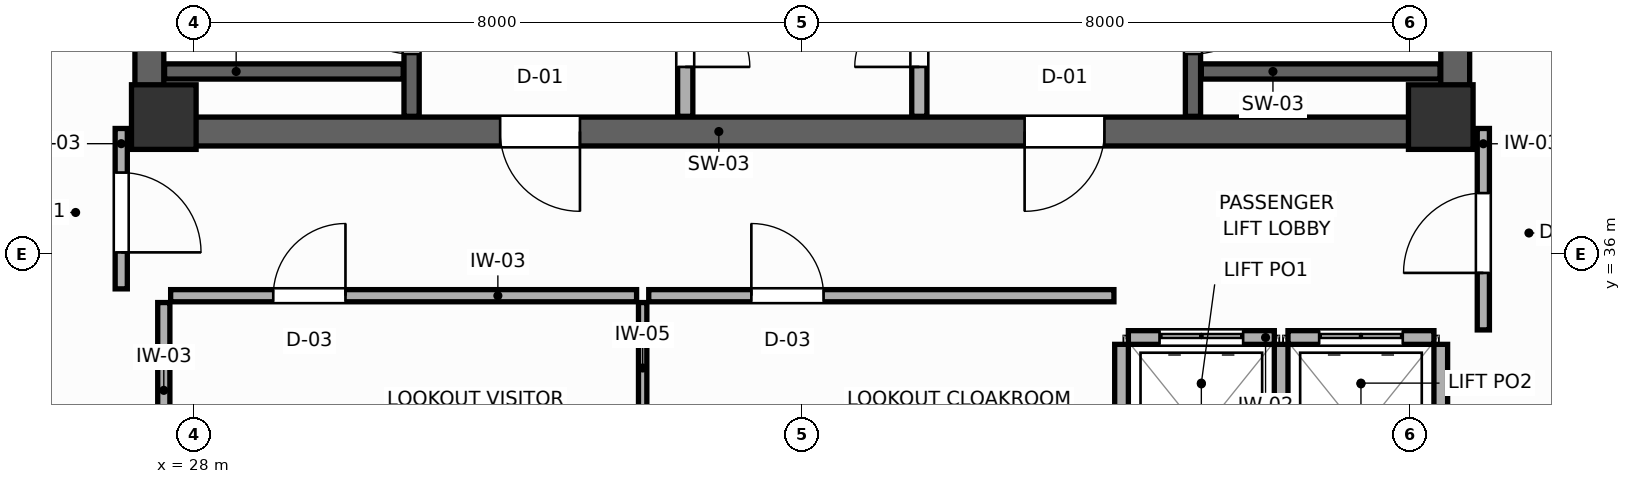
"""IFC4 building model, lengths in metres.
Left out: names, types, materials, properties, quantities, classifications, styles, units other than length and angle.
Written with IfcOpenShell. Run it as: python <this file> out.ifc"""

import sys

from ifc_helpers import new_model, si_unit, direction, frame, frame_2d, origin, origin_2d, place, context, subcontext, project, spatial, rectangle, extrude, source, transform, mapped, element, fill, save


model = new_model("IFC4")
c1 = context("Model", 3, precision=1e-05, world=origin(), true_north=direction((0.0, 1.0)))
c2 = subcontext(c1, "Body", "Model", "MODEL_VIEW")
j1 = project(units=[si_unit("LENGTHUNIT", "METRE"), si_unit("PLANEANGLEUNIT", "RADIAN")], contexts=[c1])
p1 = place(None, origin())
s1 = spatial("IfcSite", under=j1, at=p1, CompositionType="ELEMENT")
p2 = place(p1, origin())
s2 = spatial("IfcBuilding", under=s1, at=p2, CompositionType="ELEMENT")
p3 = place(p2, frame((0.0, 0.0, 279.6)))
s3 = spatial("IfcBuildingStorey", under=s2, at=p3, CompositionType="ELEMENT", Elevation=279.6)
p4 = place(p3, frame((27.22, 37.61, 0.0), z_axis=(0.0, 0.0, 1.0), x_axis=(1.0, 0.0, 0.0)))
e1 = element("IfcWall", 1, at=p4, inside=s3, PredefinedType="SHEAR", context=c2, shape_type="SweptSolid", body=[
    extrude(rectangle(XDim=17.56, YDim=0.38, at=frame_2d((8.78, 0.0))), origin(), (0.0, 0.0, 1.0), 4.2),
])
p5 = place(p4, frame((4.805, 0.0, 0.0)))
e2 = element("IfcOpeningElement", 2, at=p5, cuts=e1, PredefinedType="OPENING", context=c2, shape_type="SweptSolid", body=[
    extrude(rectangle(XDim=1.05, YDim=2.1, at=frame_2d((0.525, 1.05))), frame((0.0, 0.2, 0.0), z_axis=(0.0, -1.0, 0.0), x_axis=(1.0, 0.0, 0.0)), (0.0, 0.0, 1.0), 0.4),
])
p6 = place(p4, frame((11.705, 0.0, 0.0)))
e3 = element("IfcOpeningElement", 3, at=p6, cuts=e1, PredefinedType="OPENING", context=c2, shape_type="SweptSolid", body=[
    extrude(rectangle(XDim=1.05, YDim=2.1, at=frame_2d((0.525, 1.05))), frame((0.0, 0.2, 0.0), z_axis=(0.0, -1.0, 0.0), x_axis=(1.0, 0.0, 0.0)), (0.0, 0.0, 1.0), 0.4),
])
for number, where, z_axis, x_axis in (
    (4, (27.41, 37.8, 0.0), (0.0, 0.0, 1.0), (0.0, 1.0, 0.0)),
    (5, (44.59, 37.8, 0.0), (0.0, 0.0, 1.0), (0.0, 1.0, 0.0)),
):
    element("IfcWall", number, at=place(p3, frame(where, z_axis=z_axis, x_axis=x_axis)), inside=s3, PredefinedType="SHEAR", context=c2, shape_type="SweptSolid", body=[
        extrude(rectangle(XDim=9.0, YDim=0.38, at=frame_2d((4.5, 0.0))), origin(), (0.0, 0.0, 1.0), 4.2),
    ])
m1 = source(origin(), c2, "Body", "SweptSolid", [
    extrude(rectangle(XDim=0.85, YDim=0.85, at=origin_2d()), origin(), (0.0, 0.0, 1.0), 4.2),
])
for number, where, z_axis, x_axis in (
    (6, (27.6, 37.8, 0.0), (0.0, 0.0, 1.0), (1.0, 0.0, 0.0)),
    (7, (44.4, 37.8, 0.0), (0.0, 0.0, 1.0), (1.0, 0.0, 0.0)),
):
    element("IfcColumn", number, at=place(p3, frame(where, z_axis=z_axis, x_axis=x_axis)), inside=s3, PredefinedType="COLUMN", context=c2, shape_type="MappedRepresentation", body=[
        mapped(m1, transform((0.0, 0.0, 0.0), scale=1.0)),
    ])
p7 = place(p3, frame((30.86, 37.81, 0.0), z_axis=(0.0, 0.0, 1.0), x_axis=(0.0, 1.0, 0.0)))
e8 = element("IfcWall", 8, at=p7, inside=s3, PredefinedType="SHEAR", context=c2, shape_type="SweptSolid", body=[
    extrude(rectangle(XDim=8.98, YDim=0.2, at=frame_2d((4.49, 0.0))), origin(), (0.0, 0.0, 1.0), 4.2),
])
p8 = place(p7, frame((0.82, 0.0, 0.0)))
e9 = element("IfcOpeningElement", 9, at=p8, cuts=e8, PredefinedType="OPENING", context=c2, shape_type="SweptSolid", body=[
    extrude(rectangle(XDim=1.05, YDim=2.1, at=frame_2d((0.525, 1.05))), frame((0.0, 0.11, 0.0), z_axis=(0.0, -1.0, 0.0), x_axis=(1.0, 0.0, 0.0)), (0.0, 0.0, 1.0), 0.22),
])
p9 = place(p3, frame((27.61, 38.4, 0.0), z_axis=(0.0, 0.0, 1.0), x_axis=(1.0, 0.0, 0.0)))
e10 = element("IfcWall", 10, at=p9, inside=s3, PredefinedType="SHEAR", context=c2, shape_type="SweptSolid", body=[
    extrude(rectangle(XDim=3.14, YDim=0.2, at=frame_2d((1.57, 0.0))), origin(), (0.0, 0.0, 1.0), 4.2),
])
p10 = place(p3, frame((41.14, 37.81, 0.0), z_axis=(0.0, 0.0, 1.0), x_axis=(0.0, 1.0, 0.0)))
e11 = element("IfcWall", 11, at=p10, inside=s3, PredefinedType="SHEAR", context=c2, shape_type="SweptSolid", body=[
    extrude(rectangle(XDim=8.98, YDim=0.2, at=frame_2d((4.49, 0.0))), origin(), (0.0, 0.0, 1.0), 4.2),
])
p11 = place(p10, frame((0.82, 0.0, 0.0)))
e12 = element("IfcOpeningElement", 12, at=p11, cuts=e11, PredefinedType="OPENING", context=c2, shape_type="SweptSolid", body=[
    extrude(rectangle(XDim=1.05, YDim=2.1, at=frame_2d((0.525, 1.05))), frame((0.0, 0.11, 0.0), z_axis=(0.0, -1.0, 0.0), x_axis=(1.0, 0.0, 0.0)), (0.0, 0.0, 1.0), 0.22),
])
p12 = place(p3, frame((41.25, 38.4, 0.0), z_axis=(0.0, 0.0, 1.0), x_axis=(1.0, 0.0, 0.0)))
e13 = element("IfcWall", 13, at=p12, inside=s3, PredefinedType="SHEAR", context=c2, shape_type="SweptSolid", body=[
    extrude(rectangle(XDim=3.14, YDim=0.2, at=frame_2d((1.57, 0.0))), origin(), (0.0, 0.0, 1.0), 4.2),
])
p13 = place(p3, frame((34.46, 37.81, 0.0), z_axis=(0.0, 0.0, 1.0), x_axis=(0.0, 1.0, 0.0)))
e14 = element("IfcWall", 14, at=p13, inside=s3, PredefinedType="PARTITIONING", context=c2, shape_type="SweptSolid", body=[
    extrude(rectangle(XDim=8.98, YDim=0.2, at=frame_2d((4.49, 0.0))), origin(), (0.0, 0.0, 1.0), 3.96),
])
p14 = place(p13, frame((0.65, 0.0, 0.0)))
e15 = element("IfcOpeningElement", 15, at=p14, cuts=e14, PredefinedType="OPENING", context=c2, shape_type="SweptSolid", body=[
    extrude(rectangle(XDim=0.85, YDim=2.05, at=frame_2d((0.425, 1.025))), frame((0.0, 0.11, 0.0), z_axis=(0.0, -1.0, 0.0), x_axis=(1.0, 0.0, 0.0)), (0.0, 0.0, 1.0), 0.22),
])
p15 = place(p3, frame((37.54, 37.81, 0.0), z_axis=(0.0, 0.0, 1.0), x_axis=(0.0, 1.0, 0.0)))
e16 = element("IfcWall", 16, at=p15, inside=s3, PredefinedType="PARTITIONING", context=c2, shape_type="SweptSolid", body=[
    extrude(rectangle(XDim=8.98, YDim=0.2, at=frame_2d((4.49, 0.0))), origin(), (0.0, 0.0, 1.0), 3.96),
])
p16 = place(p15, frame((0.65, 0.0, 0.0)))
e17 = element("IfcOpeningElement", 17, at=p16, cuts=e16, PredefinedType="OPENING", context=c2, shape_type="SweptSolid", body=[
    extrude(rectangle(XDim=0.85, YDim=2.05, at=frame_2d((0.425, 1.025))), frame((0.0, 0.11, 0.0), z_axis=(0.0, -1.0, 0.0), x_axis=(1.0, 0.0, 0.0)), (0.0, 0.0, 1.0), 0.22),
])
p17 = place(p3, frame((40.29, 34.9, 0.0), z_axis=(0.0, 0.0, 1.0), x_axis=(1.0, 0.0, 0.0)))
e18 = element("IfcWall", 18, at=p17, inside=s3, PredefinedType="PARTITIONING", context=c2, shape_type="SweptSolid", body=[
    extrude(rectangle(XDim=1.92, YDim=0.18, at=frame_2d((0.96, 0.0))), origin(), (0.0, 0.0, 1.0), 3.96),
])
p18 = place(p17, frame((0.41, 0.0, 0.0)))
e19 = element("IfcOpeningElement", 19, at=p18, cuts=e18, PredefinedType="OPENING", context=c2, shape_type="SweptSolid", body=[
    extrude(rectangle(XDim=1.1, YDim=2.1, at=frame_2d((0.55, 1.05))), frame((0.0, 0.1, 0.0), z_axis=(0.0, -1.0, 0.0), x_axis=(1.0, 0.0, 0.0)), (0.0, 0.0, 1.0), 0.2),
])
p19 = place(p3, frame((40.2, 32.49, 0.0), z_axis=(0.0, 0.0, 1.0), x_axis=(0.0, 1.0, 0.0)))
e20 = element("IfcWall", 20, at=p19, inside=s3, PredefinedType="PARTITIONING", context=c2, shape_type="SweptSolid", body=[
    extrude(rectangle(XDim=2.32, YDim=0.18, at=frame_2d((1.16, 0.0))), origin(), (0.0, 0.0, 1.0), 3.96),
])
p20 = place(p3, frame((42.39, 34.9, 0.0), z_axis=(0.0, 0.0, 1.0), x_axis=(1.0, 0.0, 0.0)))
e21 = element("IfcWall", 21, at=p20, inside=s3, PredefinedType="PARTITIONING", context=c2, shape_type="SweptSolid", body=[
    extrude(rectangle(XDim=1.92, YDim=0.18, at=frame_2d((0.96, 0.0))), origin(), (0.0, 0.0, 1.0), 3.96),
])
p21 = place(p20, frame((0.41, 0.0, 0.0)))
e22 = element("IfcOpeningElement", 22, at=p21, cuts=e21, PredefinedType="OPENING", context=c2, shape_type="SweptSolid", body=[
    extrude(rectangle(XDim=1.1, YDim=2.1, at=frame_2d((0.55, 1.05))), frame((0.0, 0.1, 0.0), z_axis=(0.0, -1.0, 0.0), x_axis=(1.0, 0.0, 0.0)), (0.0, 0.0, 1.0), 0.2),
])
for number, where, z_axis, x_axis in (
    (23, (42.3, 32.49, 0.0), (0.0, 0.0, 1.0), (0.0, 1.0, 0.0)),
    (24, (44.4, 32.49, 0.0), (0.0, 0.0, 1.0), (0.0, 1.0, 0.0)),
):
    element("IfcWall", number, at=place(p3, frame(where, z_axis=z_axis, x_axis=x_axis)), inside=s3, PredefinedType="PARTITIONING", context=c2, shape_type="SweptSolid", body=[
        extrude(rectangle(XDim=2.32, YDim=0.18, at=frame_2d((1.16, 0.0))), origin(), (0.0, 0.0, 1.0), 3.96),
    ])
p22 = place(p3, frame((27.6, 33.05, 0.0), z_axis=(0.0, 0.0, 1.0), x_axis=(0.0, 1.0, 0.0)))
e25 = element("IfcWall", 25, at=p22, inside=s3, PredefinedType="PARTITIONING", context=c2, shape_type="SweptSolid", body=[
    extrude(rectangle(XDim=2.31, YDim=0.16, at=frame_2d((1.155, 0.0))), origin(), (0.0, 0.0, 1.0), 3.96),
])
p23 = place(p3, frame((33.9, 32.49, 0.0), z_axis=(0.0, 0.0, 1.0), x_axis=(0.0, 1.0, 0.0)))
e26 = element("IfcWall", 26, at=p23, inside=s3, PredefinedType="MOVABLE", context=c2, shape_type="SweptSolid", body=[
    extrude(rectangle(XDim=2.87, YDim=0.11, at=frame_2d((1.435, 0.0))), origin(), (0.0, 0.0, 1.0), 3.96),
])
p24 = place(p3, frame((27.69, 35.45, 0.0), z_axis=(0.0, 0.0, 1.0), x_axis=(1.0, 0.0, 0.0)))
e27 = element("IfcWall", 27, at=p24, inside=s3, PredefinedType="PARTITIONING", context=c2, shape_type="SweptSolid", body=[
    extrude(rectangle(XDim=6.13, YDim=0.16, at=frame_2d((3.065, 0.0))), origin(), (0.0, 0.0, 1.0), 3.96),
])
p25 = place(p24, frame((1.35, 0.0, 0.0)))
e28 = element("IfcOpeningElement", 28, at=p25, cuts=e27, PredefinedType="OPENING", context=c2, shape_type="SweptSolid", body=[
    extrude(rectangle(XDim=0.95, YDim=2.05, at=frame_2d((0.475, 1.025))), frame((0.0, 0.09, 0.0), z_axis=(0.0, -1.0, 0.0), x_axis=(1.0, 0.0, 0.0)), (0.0, 0.0, 1.0), 0.18),
])
p26 = place(p3, frame((33.98, 35.45, 0.0), z_axis=(0.0, 0.0, 1.0), x_axis=(1.0, 0.0, 0.0)))
e29 = element("IfcWall", 29, at=p26, inside=s3, PredefinedType="PARTITIONING", context=c2, shape_type="SweptSolid", body=[
    extrude(rectangle(XDim=6.12, YDim=0.16, at=frame_2d((3.06, 0.0))), origin(), (0.0, 0.0, 1.0), 3.96),
])
p27 = place(p26, frame((1.35, 0.0, 0.0)))
e30 = element("IfcOpeningElement", 30, at=p27, cuts=e29, PredefinedType="OPENING", context=c2, shape_type="SweptSolid", body=[
    extrude(rectangle(XDim=0.95, YDim=2.05, at=frame_2d((0.475, 1.025))), frame((0.0, 0.09, 0.0), z_axis=(0.0, -1.0, 0.0), x_axis=(1.0, 0.0, 0.0)), (0.0, 0.0, 1.0), 0.18),
])
p28 = place(p3, frame((27.04, 35.54, 0.0), z_axis=(0.0, 0.0, 1.0), x_axis=(0.0, 1.0, 0.0)))
e31 = element("IfcWall", 31, at=p28, inside=s3, PredefinedType="PARTITIONING", context=c2, shape_type="SweptSolid", body=[
    extrude(rectangle(XDim=2.11, YDim=0.16, at=frame_2d((1.055, 0.0))), origin(), (0.0, 0.0, 1.0), 3.96),
])
p29 = place(p28, frame((0.48, 0.0, 0.0)))
e32 = element("IfcOpeningElement", 32, at=p29, cuts=e31, PredefinedType="OPENING", context=c2, shape_type="SweptSolid", body=[
    extrude(rectangle(XDim=1.05, YDim=2.1, at=frame_2d((0.525, 1.05))), frame((0.0, 0.09, 0.0), z_axis=(0.0, -1.0, 0.0), x_axis=(1.0, 0.0, 0.0)), (0.0, 0.0, 1.0), 0.18),
])
p30 = place(p3, frame((44.96, 35.0, 0.0), z_axis=(0.0, 0.0, 1.0), x_axis=(0.0, 1.0, 0.0)))
e33 = element("IfcWall", 33, at=p30, inside=s3, PredefinedType="PARTITIONING", context=c2, shape_type="SweptSolid", body=[
    extrude(rectangle(XDim=2.65, YDim=0.16, at=frame_2d((1.325, 0.0))), origin(), (0.0, 0.0, 1.0), 3.96),
])
p31 = place(p30, frame((0.75, 0.0, 0.0)))
e34 = element("IfcOpeningElement", 34, at=p31, cuts=e33, PredefinedType="OPENING", context=c2, shape_type="SweptSolid", body=[
    extrude(rectangle(XDim=1.05, YDim=2.1, at=frame_2d((0.525, 1.05))), frame((0.0, 0.09, 0.0), z_axis=(0.0, -1.0, 0.0), x_axis=(1.0, 0.0, 0.0)), (0.0, 0.0, 1.0), 0.18),
])
p32 = place(p8, origin())
e35 = element("IfcDoor", 35, at=p32, inside=s3, OperationType="SINGLE_SWING_RIGHT", PredefinedType="DOOR", context=c2, shape_type="SweptSolid", body=[
    extrude(rectangle(XDim=1.05, YDim=2.1, at=frame_2d((0.525, 1.05))), frame((0.0, 0.025, 0.0), z_axis=(0.0, -1.0, 0.0), x_axis=(1.0, 0.0, 0.0)), (0.0, 0.0, 1.0), 0.05),
])
fill(e9, e35)
p33 = place(p11, frame((1.05, 0.0, 0.0), z_axis=(0.0, 0.0, 1.0), x_axis=(-1.0, 0.0, 0.0)))
e36 = element("IfcDoor", 36, at=p33, inside=s3, OperationType="SINGLE_SWING_LEFT", PredefinedType="DOOR", context=c2, shape_type="SweptSolid", body=[
    extrude(rectangle(XDim=1.05, YDim=2.1, at=frame_2d((0.525, 1.05))), frame((0.0, 0.025, 0.0), z_axis=(0.0, -1.0, 0.0), x_axis=(1.0, 0.0, 0.0)), (0.0, 0.0, 1.0), 0.05),
])
fill(e12, e36)
p34 = place(p14, frame((0.85, 0.0, 0.0), z_axis=(0.0, 0.0, 1.0), x_axis=(-1.0, 0.0, 0.0)))
e37 = element("IfcDoor", 37, at=p34, inside=s3, OperationType="SINGLE_SWING_RIGHT", PredefinedType="DOOR", context=c2, shape_type="SweptSolid", body=[
    extrude(rectangle(XDim=0.85, YDim=2.05, at=frame_2d((0.425, 1.025))), frame((0.0, 0.025, 0.0), z_axis=(0.0, -1.0, 0.0), x_axis=(1.0, 0.0, 0.0)), (0.0, 0.0, 1.0), 0.05),
])
fill(e15, e37)
p35 = place(p16, origin())
e38 = element("IfcDoor", 38, at=p35, inside=s3, OperationType="SINGLE_SWING_LEFT", PredefinedType="DOOR", context=c2, shape_type="SweptSolid", body=[
    extrude(rectangle(XDim=0.85, YDim=2.05, at=frame_2d((0.425, 1.025))), frame((0.0, 0.025, 0.0), z_axis=(0.0, -1.0, 0.0), x_axis=(1.0, 0.0, 0.0)), (0.0, 0.0, 1.0), 0.05),
])
fill(e17, e38)
p36 = place(p18, origin())
e39 = element("IfcDoor", 39, at=p36, inside=s3, OperationType="DOUBLE_DOOR_SLIDING", PredefinedType="DOOR", context=c2, shape_type="SweptSolid", body=[
    extrude(rectangle(XDim=1.1, YDim=2.1, at=frame_2d((0.55, 1.05))), frame((0.0, 0.025, 0.0), z_axis=(0.0, -1.0, 0.0), x_axis=(1.0, 0.0, 0.0)), (0.0, 0.0, 1.0), 0.05),
])
fill(e19, e39)
p37 = place(p21, origin())
e40 = element("IfcDoor", 40, at=p37, inside=s3, OperationType="DOUBLE_DOOR_SLIDING", PredefinedType="DOOR", context=c2, shape_type="SweptSolid", body=[
    extrude(rectangle(XDim=1.1, YDim=2.1, at=frame_2d((0.55, 1.05))), frame((0.0, 0.025, 0.0), z_axis=(0.0, -1.0, 0.0), x_axis=(1.0, 0.0, 0.0)), (0.0, 0.0, 1.0), 0.05),
])
fill(e22, e40)
p38 = place(p25, origin())
e41 = element("IfcDoor", 41, at=p38, inside=s3, OperationType="SINGLE_SWING_RIGHT", PredefinedType="DOOR", context=c2, shape_type="SweptSolid", body=[
    extrude(rectangle(XDim=0.95, YDim=2.05, at=frame_2d((0.475, 1.025))), frame((0.0, 0.025, 0.0), z_axis=(0.0, -1.0, 0.0), x_axis=(1.0, 0.0, 0.0)), (0.0, 0.0, 1.0), 0.05),
])
fill(e28, e41)
p39 = place(p27, origin())
e42 = element("IfcDoor", 42, at=p39, inside=s3, OperationType="SINGLE_SWING_LEFT", PredefinedType="DOOR", context=c2, shape_type="SweptSolid", body=[
    extrude(rectangle(XDim=0.95, YDim=2.05, at=frame_2d((0.475, 1.025))), frame((0.0, 0.025, 0.0), z_axis=(0.0, -1.0, 0.0), x_axis=(1.0, 0.0, 0.0)), (0.0, 0.0, 1.0), 0.05),
])
fill(e30, e42)
p40 = place(p29, frame((1.05, 0.0, 0.0), z_axis=(0.0, 0.0, 1.0), x_axis=(-1.0, 0.0, 0.0)))
e43 = element("IfcDoor", 43, at=p40, inside=s3, OperationType="SINGLE_SWING_RIGHT", PredefinedType="DOOR", context=c2, shape_type="SweptSolid", body=[
    extrude(rectangle(XDim=1.05, YDim=2.1, at=frame_2d((0.525, 1.05))), frame((0.0, 0.025, 0.0), z_axis=(0.0, -1.0, 0.0), x_axis=(1.0, 0.0, 0.0)), (0.0, 0.0, 1.0), 0.05),
])
fill(e32, e43)
p41 = place(p31, origin())
e44 = element("IfcDoor", 44, at=p41, inside=s3, OperationType="SINGLE_SWING_LEFT", PredefinedType="DOOR", context=c2, shape_type="SweptSolid", body=[
    extrude(rectangle(XDim=1.05, YDim=2.1, at=frame_2d((0.525, 1.05))), frame((0.0, 0.025, 0.0), z_axis=(0.0, -1.0, 0.0), x_axis=(1.0, 0.0, 0.0)), (0.0, 0.0, 1.0), 0.05),
])
fill(e34, e44)
p42 = place(p5, frame((1.05, 0.0, 0.0), z_axis=(0.0, 0.0, 1.0), x_axis=(-1.0, 0.0, 0.0)))
e45 = element("IfcDoor", 45, at=p42, inside=s3, OperationType="SINGLE_SWING_LEFT", PredefinedType="DOOR", context=c2, shape_type="SweptSolid", body=[
    extrude(rectangle(XDim=1.05, YDim=2.1, at=frame_2d((0.525, 1.05))), frame((0.0, 0.025, 0.0), z_axis=(0.0, -1.0, 0.0), x_axis=(1.0, 0.0, 0.0)), (0.0, 0.0, 1.0), 0.05),
])
fill(e2, e45)
p43 = place(p6, frame((1.05, 0.0, 0.0), z_axis=(0.0, 0.0, 1.0), x_axis=(-1.0, 0.0, 0.0)))
e46 = element("IfcDoor", 46, at=p43, inside=s3, OperationType="SINGLE_SWING_RIGHT", PredefinedType="DOOR", context=c2, shape_type="SweptSolid", body=[
    extrude(rectangle(XDim=1.05, YDim=2.1, at=frame_2d((0.525, 1.05))), frame((0.0, 0.025, 0.0), z_axis=(0.0, -1.0, 0.0), x_axis=(1.0, 0.0, 0.0)), (0.0, 0.0, 1.0), 0.05),
])
fill(e3, e46)
save(model, sys.argv[1])
